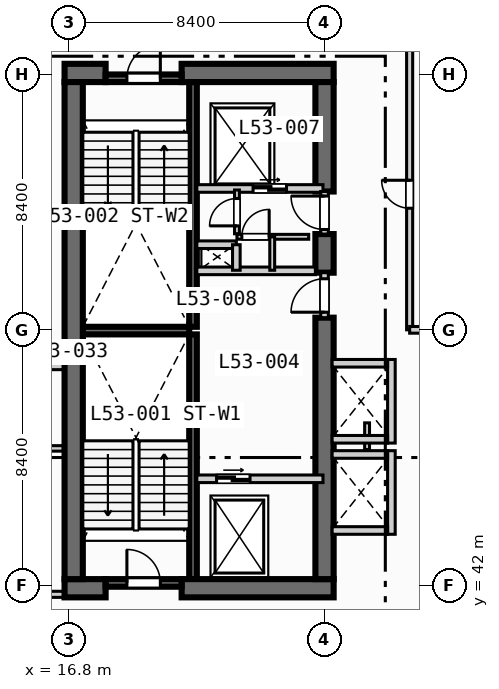
"""IFC4 building model, lengths in metres.
Left out: names, types, materials, properties, quantities, classifications, styles, units other than length and angle.
Written with IfcOpenShell. Run it as: python <this file> out.ifc"""

import sys

from ifc_helpers import new_model, si_unit, direction, frame, frame_2d, origin, place, context, subcontext, project, spatial, rectangle, extrude, element, fill, save


model = new_model("IFC4")
c1 = context("Model", 3, precision=1e-05, world=origin(), true_north=direction((0.0, 1.0)))
c2 = subcontext(c1, "Body", "Model", "MODEL_VIEW")
j1 = project(units=[si_unit("LENGTHUNIT", "METRE"), si_unit("PLANEANGLEUNIT", "RADIAN")], contexts=[c1])
p1 = place(None, origin())
s1 = spatial("IfcSite", under=j1, at=p1, CompositionType="ELEMENT")
p2 = place(p1, origin())
s2 = spatial("IfcBuilding", under=s1, at=p2, CompositionType="ELEMENT")
p3 = place(p2, frame((0.0, 0.0, 216.1)))
s3 = spatial("IfcBuildingStorey", under=s2, at=p3, CompositionType="ELEMENT", Elevation=216.1)
for number, where, z_axis, x_axis in (
    (1, (20.875, 42.2, 0.0), (0.0, 0.0, 1.0), (0.0, 1.0, 0.0)),
    (2, (20.875, 50.5, 0.0), (0.0, 0.0, 1.0), (0.0, 1.0, 0.0)),
):
    element("IfcWall", number, at=place(p3, frame(where, z_axis=z_axis, x_axis=x_axis)), inside=s3, PredefinedType="SOLIDWALL", context=c2, shape_type="SweptSolid", body=[
        extrude(rectangle(XDim=8.05, YDim=0.25, at=frame_2d((4.025, 0.0))), origin(), (0.0, 0.0, 1.0), 3.47),
    ])
p4 = place(p3, frame((17.25, 50.375, 0.0), z_axis=(0.0, 0.0, 1.0), x_axis=(1.0, 0.0, 0.0)))
e3 = element("IfcWall", 3, at=p4, inside=s3, PredefinedType="SOLIDWALL", context=c2, shape_type="SweptSolid", body=[
    extrude(rectangle(XDim=3.5, YDim=0.25, at=frame_2d((1.75, 0.0))), origin(), (0.0, 0.0, 1.0), 3.47),
])
p5 = place(p3, frame((16.65, 41.9, 0.0), z_axis=(0.0, 0.0, 1.0), x_axis=(1.0, 0.0, 0.0)))
e4 = element("IfcWall", 4, at=p5, inside=s3, PredefinedType="SHEAR", context=c2, shape_type="SweptSolid", body=[
    extrude(rectangle(XDim=1.35, YDim=0.6, at=frame_2d((0.675, 0.0))), origin(), (0.0, 0.0, 1.0), 3.47),
])
p6 = place(p3, frame((20.5, 41.9, 0.0), z_axis=(0.0, 0.0, 1.0), x_axis=(1.0, 0.0, 0.0)))
e5 = element("IfcWall", 5, at=p6, inside=s3, PredefinedType="SHEAR", context=c2, shape_type="SweptSolid", body=[
    extrude(rectangle(XDim=5.0, YDim=0.6, at=frame_2d((2.5, 0.0))), origin(), (0.0, 0.0, 1.0), 3.47),
])
p7 = place(p3, frame((16.65, 58.85, 0.0), z_axis=(0.0, 0.0, 1.0), x_axis=(1.0, 0.0, 0.0)))
e6 = element("IfcWall", 6, at=p7, inside=s3, PredefinedType="SHEAR", context=c2, shape_type="SweptSolid", body=[
    extrude(rectangle(XDim=1.35, YDim=0.6, at=frame_2d((0.675, 0.0))), origin(), (0.0, 0.0, 1.0), 3.47),
])
p8 = place(p3, frame((20.5, 58.85, 0.0), z_axis=(0.0, 0.0, 1.0), x_axis=(1.0, 0.0, 0.0)))
e7 = element("IfcWall", 7, at=p8, inside=s3, PredefinedType="SHEAR", context=c2, shape_type="SweptSolid", body=[
    extrude(rectangle(XDim=5.0, YDim=0.6, at=frame_2d((2.5, 0.0))), origin(), (0.0, 0.0, 1.0), 3.47),
])
p9 = place(p3, frame((16.95, 42.2, 0.0), z_axis=(0.0, 0.0, 1.0), x_axis=(0.0, 1.0, 0.0)))
e8 = element("IfcWall", 8, at=p9, inside=s3, PredefinedType="SHEAR", context=c2, shape_type="SweptSolid", body=[
    extrude(rectangle(XDim=16.35, YDim=0.6, at=frame_2d((8.175, 0.0))), origin(), (0.0, 0.0, 1.0), 3.47),
])
p10 = place(p3, frame((25.2, 42.2, 0.0), z_axis=(0.0, 0.0, 1.0), x_axis=(0.0, 1.0, 0.0)))
e9 = element("IfcWall", 9, at=p10, inside=s3, PredefinedType="SHEAR", context=c2, shape_type="SweptSolid", body=[
    extrude(rectangle(XDim=8.6, YDim=0.6, at=frame_2d((4.3, 0.0))), origin(), (0.0, 0.0, 1.0), 3.47),
])
p11 = place(p3, frame((25.2, 52.28, 0.0), z_axis=(0.0, 0.0, 1.0), x_axis=(0.0, 1.0, 0.0)))
e10 = element("IfcWall", 10, at=p11, inside=s3, PredefinedType="SHEAR", context=c2, shape_type="SweptSolid", body=[
    extrude(rectangle(XDim=1.27, YDim=0.6, at=frame_2d((0.635, 0.0))), origin(), (0.0, 0.0, 1.0), 3.47),
])
p12 = place(p3, frame((25.2, 54.95, 0.0), z_axis=(0.0, 0.0, 1.0), x_axis=(0.0, 1.0, 0.0)))
e11 = element("IfcWall", 11, at=p12, inside=s3, PredefinedType="SHEAR", context=c2, shape_type="SweptSolid", body=[
    extrude(rectangle(XDim=3.6, YDim=0.6, at=frame_2d((1.8, 0.0))), origin(), (0.0, 0.0, 1.0), 3.47),
])
p13 = place(p3, frame((18.0, 42.075, 0.0), z_axis=(0.0, 0.0, 1.0), x_axis=(1.0, 0.0, 0.0)))
e12 = element("IfcWall", 12, at=p13, inside=s3, PredefinedType="SOLIDWALL", context=c2, shape_type="SweptSolid", body=[
    extrude(rectangle(XDim=2.5, YDim=0.25, at=frame_2d((1.25, 0.0))), origin(), (0.0, 0.0, 1.0), 3.47),
])
p14 = place(p13, frame((0.7, 0.0, 0.0)))
e13 = element("IfcOpeningElement", 13, at=p14, cuts=e12, PredefinedType="OPENING", context=c2, shape_type="SweptSolid", body=[
    extrude(rectangle(XDim=1.1, YDim=2.15, at=frame_2d((0.55, 1.075))), frame((0.0, 0.135, 0.0), z_axis=(0.0, -1.0, 0.0), x_axis=(1.0, 0.0, 0.0)), (0.0, 0.0, 1.0), 0.27),
])
p15 = place(p3, frame((18.0, 58.675, 0.0), z_axis=(0.0, 0.0, 1.0), x_axis=(1.0, 0.0, 0.0)))
e14 = element("IfcWall", 14, at=p15, inside=s3, PredefinedType="SOLIDWALL", context=c2, shape_type="SweptSolid", body=[
    extrude(rectangle(XDim=2.5, YDim=0.25, at=frame_2d((1.25, 0.0))), origin(), (0.0, 0.0, 1.0), 3.47),
])
p16 = place(p15, frame((0.7, 0.0, 0.0)))
e15 = element("IfcOpeningElement", 15, at=p16, cuts=e14, PredefinedType="OPENING", context=c2, shape_type="SweptSolid", body=[
    extrude(rectangle(XDim=1.1, YDim=2.15, at=frame_2d((0.55, 1.075))), frame((0.0, 0.135, 0.0), z_axis=(0.0, -1.0, 0.0), x_axis=(1.0, 0.0, 0.0)), (0.0, 0.0, 1.0), 0.27),
])
p17 = place(p3, frame((21.0, 45.5, 0.0), z_axis=(0.0, 0.0, 1.0), x_axis=(1.0, 0.0, 0.0)))
e16 = element("IfcWall", 16, at=p17, inside=s3, PredefinedType="SOLIDWALL", context=c2, shape_type="SweptSolid", body=[
    extrude(rectangle(XDim=4.15, YDim=0.25, at=frame_2d((2.075, 0.0))), origin(), (0.0, 0.0, 1.0), 3.47),
])
p18 = place(p17, frame((0.65, 0.0, 0.0)))
e17 = element("IfcOpeningElement", 17, at=p18, cuts=e16, PredefinedType="OPENING", context=c2, shape_type="SweptSolid", body=[
    extrude(rectangle(XDim=1.1, YDim=2.15, at=frame_2d((0.55, 1.075))), frame((0.0, 0.135, 0.0), z_axis=(0.0, -1.0, 0.0), x_axis=(1.0, 0.0, 0.0)), (0.0, 0.0, 1.0), 0.27),
])
p19 = place(p3, frame((25.2, 50.8, 0.0), z_axis=(0.0, 0.0, 1.0), x_axis=(0.0, 1.0, 0.0)))
e18 = element("IfcWall", 18, at=p19, inside=s3, PredefinedType="SOLIDWALL", context=c2, shape_type="SweptSolid", body=[
    extrude(rectangle(XDim=1.48, YDim=0.25, at=frame_2d((0.74, 0.0))), origin(), (0.0, 0.0, 1.0), 3.47),
])
p20 = place(p19, frame((0.18, 0.0, 0.0)))
e19 = element("IfcOpeningElement", 19, at=p20, cuts=e18, PredefinedType="OPENING", context=c2, shape_type="SweptSolid", body=[
    extrude(rectangle(XDim=1.1, YDim=2.15, at=frame_2d((0.55, 1.075))), frame((0.0, 0.135, 0.0), z_axis=(0.0, -1.0, 0.0), x_axis=(1.0, 0.0, 0.0)), (0.0, 0.0, 1.0), 0.27),
])
p21 = place(p3, frame((21.0, 52.34, 0.0), z_axis=(0.0, 0.0, 1.0), x_axis=(1.0, 0.0, 0.0)))
e20 = element("IfcWall", 20, at=p21, inside=s3, PredefinedType="SOLIDWALL", context=c2, shape_type="SweptSolid", body=[
    extrude(rectangle(XDim=3.9, YDim=0.25, at=frame_2d((1.95, 0.0))), origin(), (0.0, 0.0, 1.0), 3.47),
])
p22 = place(p3, frame((21.0, 55.05, 0.0), z_axis=(0.0, 0.0, 1.0), x_axis=(1.0, 0.0, 0.0)))
e21 = element("IfcWall", 21, at=p22, inside=s3, PredefinedType="SOLIDWALL", context=c2, shape_type="SweptSolid", body=[
    extrude(rectangle(XDim=4.15, YDim=0.25, at=frame_2d((2.075, 0.0))), origin(), (0.0, 0.0, 1.0), 3.47),
])
p23 = place(p22, frame((1.85, 0.0, 0.0)))
e22 = element("IfcOpeningElement", 22, at=p23, cuts=e21, PredefinedType="OPENING", context=c2, shape_type="SweptSolid", body=[
    extrude(rectangle(XDim=1.1, YDim=2.15, at=frame_2d((0.55, 1.075))), frame((0.0, 0.135, 0.0), z_axis=(0.0, -1.0, 0.0), x_axis=(1.0, 0.0, 0.0)), (0.0, 0.0, 1.0), 0.27),
])
p24 = place(p3, frame((25.2, 53.55, 0.0), z_axis=(0.0, 0.0, 1.0), x_axis=(0.0, 1.0, 0.0)))
e23 = element("IfcWall", 23, at=p24, inside=s3, PredefinedType="SOLIDWALL", context=c2, shape_type="SweptSolid", body=[
    extrude(rectangle(XDim=1.4, YDim=0.25, at=frame_2d((0.7, 0.0))), origin(), (0.0, 0.0, 1.0), 3.47),
])
p25 = place(p24, frame((0.15, 0.0, 0.0)))
e24 = element("IfcOpeningElement", 24, at=p25, cuts=e23, PredefinedType="OPENING", context=c2, shape_type="SweptSolid", body=[
    extrude(rectangle(XDim=1.1, YDim=2.15, at=frame_2d((0.55, 1.075))), frame((0.0, 0.135, 0.0), z_axis=(0.0, -1.0, 0.0), x_axis=(1.0, 0.0, 0.0)), (0.0, 0.0, 1.0), 0.27),
])
p26 = place(p3, frame((21.0, 53.2, 0.0), z_axis=(0.0, 0.0, 1.0), x_axis=(1.0, 0.0, 0.0)))
e25 = element("IfcWall", 25, at=p26, inside=s3, PredefinedType="SOLIDWALL", context=c2, shape_type="SweptSolid", body=[
    extrude(rectangle(XDim=1.3, YDim=0.25, at=frame_2d((0.65, 0.0))), origin(), (0.0, 0.0, 1.0), 3.47),
])
p27 = place(p3, frame((22.3, 52.36, 0.0), z_axis=(0.0, 0.0, 1.0), x_axis=(0.0, 1.0, 0.0)))
e26 = element("IfcWall", 26, at=p27, inside=s3, PredefinedType="SOLIDWALL", context=c2, shape_type="SweptSolid", body=[
    extrude(rectangle(XDim=0.84, YDim=0.25, at=frame_2d((0.42, 0.0))), origin(), (0.0, 0.0, 1.0), 3.47),
])
p28 = place(p3, frame((22.32, 53.56, 0.0), z_axis=(0.0, 0.0, 1.0), x_axis=(0.0, 1.0, 0.0)))
e27 = element("IfcWall", 27, at=p28, inside=s3, PredefinedType="PARTITIONING", context=c2, shape_type="SweptSolid", body=[
    extrude(rectangle(XDim=1.44, YDim=0.16, at=frame_2d((0.72, 0.0))), origin(), (0.0, 0.0, 1.0), 3.47),
])
p29 = place(p28, frame((0.26, 0.0, 0.0)))
e28 = element("IfcOpeningElement", 28, at=p29, cuts=e27, PredefinedType="OPENING", context=c2, shape_type="SweptSolid", body=[
    extrude(rectangle(XDim=0.9, YDim=2.1, at=frame_2d((0.45, 1.05))), frame((0.0, 0.09, 0.0), z_axis=(0.0, -1.0, 0.0), x_axis=(1.0, 0.0, 0.0)), (0.0, 0.0, 1.0), 0.18),
])
p30 = place(p3, frame((22.32, 53.46, 0.0), z_axis=(0.0, 0.0, 1.0), x_axis=(1.0, 0.0, 0.0)))
e29 = element("IfcWall", 29, at=p30, inside=s3, PredefinedType="PARTITIONING", context=c2, shape_type="SweptSolid", body=[
    extrude(rectangle(XDim=2.36, YDim=0.16, at=frame_2d((1.18, 0.0))), origin(), (0.0, 0.0, 1.0), 3.47),
])
p31 = place(p30, frame((0.16, 0.0, 0.0)))
e30 = element("IfcOpeningElement", 30, at=p31, cuts=e29, PredefinedType="OPENING", context=c2, shape_type="SweptSolid", body=[
    extrude(rectangle(XDim=0.9, YDim=2.1, at=frame_2d((0.45, 1.05))), frame((0.0, 0.09, 0.0), z_axis=(0.0, -1.0, 0.0), x_axis=(1.0, 0.0, 0.0)), (0.0, 0.0, 1.0), 0.18),
])
p32 = place(p3, frame((23.48, 52.36, 0.0), z_axis=(0.0, 0.0, 1.0), x_axis=(0.0, 1.0, 0.0)))
e31 = element("IfcWall", 31, at=p32, inside=s3, PredefinedType="PARTITIONING", context=c2, shape_type="SweptSolid", body=[
    extrude(rectangle(XDim=1.1, YDim=0.16, at=frame_2d((0.55, 0.0))), origin(), (0.0, 0.0, 1.0), 3.47),
])
p33 = place(p3, frame((27.4, 43.675, 0.0), z_axis=(0.0, 0.0, 1.0), x_axis=(0.0, 1.0, 0.0)))
e32 = element("IfcWall", 32, at=p33, inside=s3, PredefinedType="SOLIDWALL", context=c2, shape_type="SweptSolid", body=[
    extrude(rectangle(XDim=2.75, YDim=0.25, at=frame_2d((1.375, 0.0))), origin(), (0.0, 0.0, 1.0), 3.47),
])
for number, where, z_axis, x_axis in (
    (33, (25.45, 43.8, 0.0), (0.0, 0.0, 1.0), (1.0, 0.0, 0.0)),
    (34, (25.45, 46.3, 0.0), (0.0, 0.0, 1.0), (1.0, 0.0, 0.0)),
):
    element("IfcWall", number, at=place(p3, frame(where, z_axis=z_axis, x_axis=x_axis)), inside=s3, PredefinedType="SOLIDWALL", context=c2, shape_type="SweptSolid", body=[
        extrude(rectangle(XDim=1.825, YDim=0.25, at=frame_2d((0.913, 0.0))), origin(), (0.0, 0.0, 1.0), 3.47),
    ])
p34 = place(p3, frame((26.6, 46.46, 0.0), z_axis=(0.0, 0.0, 1.0), x_axis=(0.0, 1.0, 0.0)))
e35 = element("IfcWall", 35, at=p34, inside=s3, PredefinedType="PARTITIONING", context=c2, shape_type="SweptSolid", body=[
    extrude(rectangle(XDim=0.88, YDim=0.16, at=frame_2d((0.44, 0.0))), origin(), (0.0, 0.0, 1.0), 3.47),
])
p35 = place(p3, frame((27.4, 46.675, 0.0), z_axis=(0.0, 0.0, 1.0), x_axis=(0.0, 1.0, 0.0)))
e36 = element("IfcWall", 36, at=p35, inside=s3, PredefinedType="SOLIDWALL", context=c2, shape_type="SweptSolid", body=[
    extrude(rectangle(XDim=2.75, YDim=0.25, at=frame_2d((1.375, 0.0))), origin(), (0.0, 0.0, 1.0), 3.47),
])
for number, where, z_axis, x_axis in (
    (37, (25.45, 46.8, 0.0), (0.0, 0.0, 1.0), (1.0, 0.0, 0.0)),
    (38, (25.45, 49.3, 0.0), (0.0, 0.0, 1.0), (1.0, 0.0, 0.0)),
):
    element("IfcWall", number, at=place(p3, frame(where, z_axis=z_axis, x_axis=x_axis)), inside=s3, PredefinedType="SOLIDWALL", context=c2, shape_type="SweptSolid", body=[
        extrude(rectangle(XDim=1.825, YDim=0.25, at=frame_2d((0.913, 0.0))), origin(), (0.0, 0.0, 1.0), 3.47),
    ])
p36 = place(p3, frame((0.35, 41.7, 0.0), z_axis=(0.0, 0.0, 1.0), x_axis=(1.0, 0.0, 0.0)))
e39 = element("IfcWall", 39, at=p36, inside=s3, PredefinedType="PARTITIONING", context=c2, shape_type="SweptSolid", body=[
    extrude(rectangle(XDim=16.25, YDim=0.2, at=frame_2d((8.125, 0.0))), origin(), (0.0, 0.0, 1.0), 2.82),
])
p37 = place(p36, frame((14.2, 0.0, 0.0)))
e40 = element("IfcOpeningElement", 40, at=p37, cuts=e39, PredefinedType="OPENING", context=c2, shape_type="SweptSolid", body=[
    extrude(rectangle(XDim=1.0, YDim=2.15, at=frame_2d((0.5, 1.075))), frame((0.0, 0.11, 0.0), z_axis=(0.0, -1.0, 0.0), x_axis=(1.0, 0.0, 0.0)), (0.0, 0.0, 1.0), 0.22),
])
p38 = place(p3, frame((0.35, 49.2, 0.0), z_axis=(0.0, 0.0, 1.0), x_axis=(1.0, 0.0, 0.0)))
e41 = element("IfcWall", 41, at=p38, inside=s3, PredefinedType="PARTITIONING", context=c2, shape_type="SweptSolid", body=[
    extrude(rectangle(XDim=16.25, YDim=0.22, at=frame_2d((8.125, 0.0))), origin(), (0.0, 0.0, 1.0), 3.47),
])
p39 = place(p3, frame((11.6, 46.5, 0.0), z_axis=(0.0, 0.0, 1.0), x_axis=(1.0, 0.0, 0.0)))
e42 = element("IfcWall", 42, at=p39, inside=s3, PredefinedType="PLUMBINGWALL", context=c2, shape_type="SweptSolid", body=[
    extrude(rectangle(XDim=5.0, YDim=0.18, at=frame_2d((2.5, 0.0))), origin(), (0.0, 0.0, 1.0), 3.47),
])
p40 = place(p39, frame((0.7, 0.0, 0.0)))
e43 = element("IfcOpeningElement", 43, at=p40, cuts=e42, PredefinedType="OPENING", context=c2, shape_type="SweptSolid", body=[
    extrude(rectangle(XDim=0.9, YDim=2.1, at=frame_2d((0.45, 1.05))), frame((0.0, 0.1, 0.0), z_axis=(0.0, -1.0, 0.0), x_axis=(1.0, 0.0, 0.0)), (0.0, 0.0, 1.0), 0.2),
])
p41 = place(p39, frame((3.15, 0.0, 0.0)))
e44 = element("IfcOpeningElement", 44, at=p41, cuts=e42, PredefinedType="OPENING", context=c2, shape_type="SweptSolid", body=[
    extrude(rectangle(XDim=0.92, YDim=2.1, at=frame_2d((0.46, 1.05))), frame((0.0, 0.1, 0.0), z_axis=(0.0, -1.0, 0.0), x_axis=(1.0, 0.0, 0.0)), (0.0, 0.0, 1.0), 0.2),
])
p42 = place(p3, frame((28.0, 50.4, 0.0), z_axis=(0.0, 0.0, 1.0), x_axis=(0.0, 1.0, 0.0)))
e45 = element("IfcWall", 45, at=p42, inside=s3, PredefinedType="PARTITIONING", context=c2, shape_type="SweptSolid", body=[
    extrude(rectangle(XDim=21.8, YDim=0.2, at=frame_2d((10.9, 0.0))), origin(), (0.0, 0.0, 1.0), 3.47),
])
p43 = place(p42, frame((4.0, 0.0, 0.0)))
e46 = element("IfcOpeningElement", 46, at=p43, cuts=e45, PredefinedType="OPENING", context=c2, shape_type="SweptSolid", body=[
    extrude(rectangle(XDim=0.92, YDim=2.1, at=frame_2d((0.46, 1.05))), frame((0.0, 0.11, 0.0), z_axis=(0.0, -1.0, 0.0), x_axis=(1.0, 0.0, 0.0)), (0.0, 0.0, 1.0), 0.22),
])
p44 = place(p3, frame((28.0, 50.4, 0.0), z_axis=(0.0, 0.0, 1.0), x_axis=(1.0, 0.0, 0.0)))
e47 = element("IfcWall", 47, at=p44, inside=s3, PredefinedType="PARTITIONING", context=c2, shape_type="SweptSolid", body=[
    extrude(rectangle(XDim=5.3, YDim=0.22, at=frame_2d((2.65, 0.0))), origin(), (0.0, 0.0, 1.0), 2.82),
])
p45 = place(p14, origin())
e48 = element("IfcDoor", 48, at=p45, inside=s3, OperationType="SINGLE_SWING_LEFT", PredefinedType="DOOR", context=c2, shape_type="SweptSolid", body=[
    extrude(rectangle(XDim=1.1, YDim=2.15, at=frame_2d((0.55, 1.075))), frame((0.0, 0.025, 0.0), z_axis=(0.0, -1.0, 0.0), x_axis=(1.0, 0.0, 0.0)), (0.0, 0.0, 1.0), 0.05),
])
fill(e13, e48)
p46 = place(p16, origin())
e49 = element("IfcDoor", 49, at=p46, inside=s3, OperationType="SINGLE_SWING_RIGHT", PredefinedType="DOOR", context=c2, shape_type="SweptSolid", body=[
    extrude(rectangle(XDim=1.1, YDim=2.15, at=frame_2d((0.55, 1.075))), frame((0.0, 0.025, 0.0), z_axis=(0.0, -1.0, 0.0), x_axis=(1.0, 0.0, 0.0)), (0.0, 0.0, 1.0), 0.05),
])
fill(e15, e49)
p47 = place(p18, origin())
e50 = element("IfcDoor", 50, at=p47, inside=s3, OperationType="SLIDING_TO_LEFT", PredefinedType="DOOR", context=c2, shape_type="SweptSolid", body=[
    extrude(rectangle(XDim=1.1, YDim=2.15, at=frame_2d((0.55, 1.075))), frame((0.0, 0.025, 0.0), z_axis=(0.0, -1.0, 0.0), x_axis=(1.0, 0.0, 0.0)), (0.0, 0.0, 1.0), 0.05),
])
fill(e17, e50)
p48 = place(p20, origin())
e51 = element("IfcDoor", 51, at=p48, inside=s3, OperationType="SINGLE_SWING_LEFT", PredefinedType="DOOR", context=c2, shape_type="SweptSolid", body=[
    extrude(rectangle(XDim=1.1, YDim=2.15, at=frame_2d((0.55, 1.075))), frame((0.0, 0.025, 0.0), z_axis=(0.0, -1.0, 0.0), x_axis=(1.0, 0.0, 0.0)), (0.0, 0.0, 1.0), 0.05),
])
fill(e19, e51)
p49 = place(p23, origin())
e52 = element("IfcDoor", 52, at=p49, inside=s3, OperationType="SLIDING_TO_LEFT", PredefinedType="DOOR", context=c2, shape_type="SweptSolid", body=[
    extrude(rectangle(XDim=1.1, YDim=2.15, at=frame_2d((0.55, 1.075))), frame((0.0, 0.025, 0.0), z_axis=(0.0, -1.0, 0.0), x_axis=(1.0, 0.0, 0.0)), (0.0, 0.0, 1.0), 0.05),
])
fill(e22, e52)
p50 = place(p25, origin())
e53 = element("IfcDoor", 53, at=p50, inside=s3, OperationType="SINGLE_SWING_RIGHT", PredefinedType="DOOR", context=c2, shape_type="SweptSolid", body=[
    extrude(rectangle(XDim=1.1, YDim=2.15, at=frame_2d((0.55, 1.075))), frame((0.0, 0.025, 0.0), z_axis=(0.0, -1.0, 0.0), x_axis=(1.0, 0.0, 0.0)), (0.0, 0.0, 1.0), 0.05),
])
fill(e24, e53)
p51 = place(p29, origin())
e54 = element("IfcDoor", 54, at=p51, inside=s3, OperationType="SINGLE_SWING_LEFT", PredefinedType="DOOR", context=c2, shape_type="SweptSolid", body=[
    extrude(rectangle(XDim=0.9, YDim=2.1, at=frame_2d((0.45, 1.05))), frame((0.0, 0.025, 0.0), z_axis=(0.0, -1.0, 0.0), x_axis=(1.0, 0.0, 0.0)), (0.0, 0.0, 1.0), 0.05),
])
fill(e28, e54)
p52 = place(p31, origin())
e55 = element("IfcDoor", 55, at=p52, inside=s3, OperationType="SINGLE_SWING_RIGHT", PredefinedType="DOOR", context=c2, shape_type="SweptSolid", body=[
    extrude(rectangle(XDim=0.9, YDim=2.1, at=frame_2d((0.45, 1.05))), frame((0.0, 0.025, 0.0), z_axis=(0.0, -1.0, 0.0), x_axis=(1.0, 0.0, 0.0)), (0.0, 0.0, 1.0), 0.05),
])
fill(e30, e55)
p53 = place(p43, origin())
e56 = element("IfcDoor", 56, at=p53, inside=s3, OperationType="SINGLE_SWING_RIGHT", PredefinedType="DOOR", context=c2, shape_type="SweptSolid", body=[
    extrude(rectangle(XDim=0.92, YDim=2.1, at=frame_2d((0.46, 1.05))), frame((0.0, 0.025, 0.0), z_axis=(0.0, -1.0, 0.0), x_axis=(1.0, 0.0, 0.0)), (0.0, 0.0, 1.0), 0.05),
])
fill(e46, e56)
save(model, sys.argv[1])
